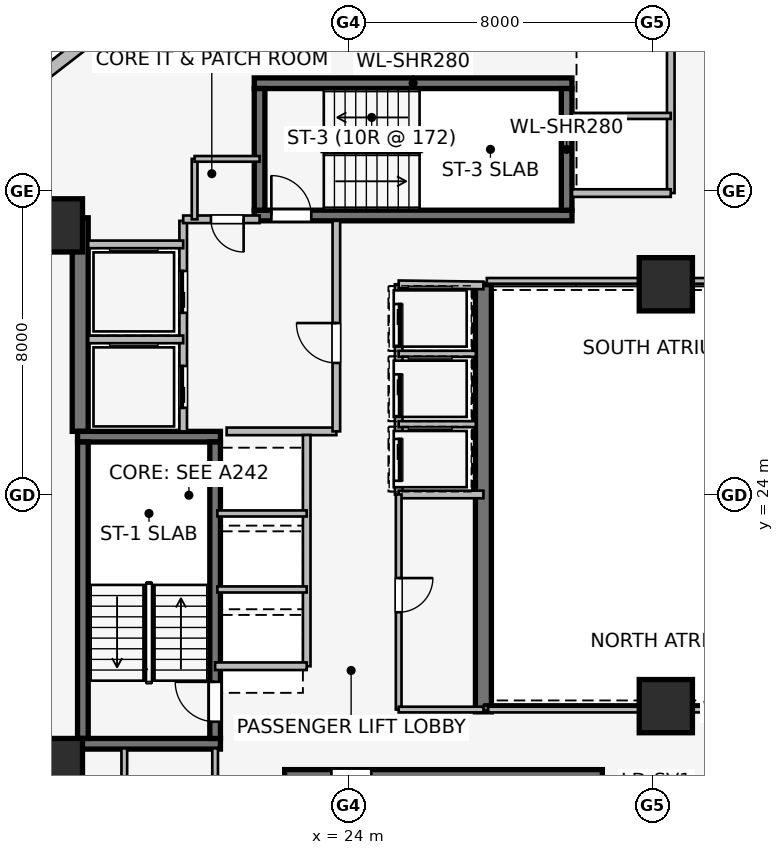
"""IFC4 building model, lengths in metres.
Left out: names, types, materials, properties, quantities, classifications, styles, units other than length and angle.
Written with IfcOpenShell. Run it as: python <this file> out.ifc"""

import sys

from ifc_helpers import new_model, si_unit, direction, frame, frame_2d, origin, origin_2d, place, context, subcontext, project, spatial, rectangle, extrude, element, fill, save


model = new_model("IFC4")
c1 = context("Model", 3, precision=1e-05, world=origin(), true_north=direction((0.0, 1.0)))
c2 = subcontext(c1, "Body", "Model", "MODEL_VIEW")
j1 = project(units=[si_unit("LENGTHUNIT", "METRE"), si_unit("PLANEANGLEUNIT", "RADIAN")], contexts=[c1])
p1 = place(None, origin())
s1 = spatial("IfcSite", under=j1, at=p1, CompositionType="ELEMENT")
p2 = place(p1, origin())
s2 = spatial("IfcBuilding", under=s1, at=p2, CompositionType="ELEMENT")
p3 = place(p2, frame((0.0, 0.0, 149.85)))
s3 = spatial("IfcBuildingStorey", under=s2, at=p3, CompositionType="ELEMENT", Elevation=149.85)
p4 = place(p3, frame((16.94, 25.68, 0.0), z_axis=(0.0, 0.0, 1.0), x_axis=(0.0, 1.0, 0.0)))
e1 = element("IfcWall", 1, at=p4, inside=s3, PredefinedType="SHEAR", context=c2, shape_type="SweptSolid", body=[
    extrude(rectangle(XDim=5.62, YDim=0.42, at=frame_2d((2.81, 0.0))), origin(), (0.0, 0.0, 1.0), 3.45),
])
p5 = place(p3, frame((27.55, 29.55, 0.0), z_axis=(0.0, 0.0, 1.0), x_axis=(0.0, -1.0, 0.0)))
e2 = element("IfcWall", 2, at=p5, inside=s3, PredefinedType="SHEAR", context=c2, shape_type="SweptSolid", body=[
    extrude(rectangle(XDim=11.25, YDim=0.42, at=frame_2d((5.625, 0.0))), origin(), (0.0, 0.0, 1.0), 3.45),
])
for number, where, z_axis, x_axis in (
    (3, (16.87, 17.46, 0.0), (0.0, 0.0, 1.0), (1.0, 0.0, 0.0)),
    (4, (20.63, 25.54, 0.0), (0.0, 0.0, 1.0), (-1.0, 0.0, 0.0)),
):
    element("IfcWall", number, at=place(p3, frame(where, z_axis=z_axis, x_axis=x_axis)), inside=s3, PredefinedType="SHEAR", context=c2, shape_type="SweptSolid", body=[
        extrude(rectangle(XDim=3.76, YDim=0.28, at=frame_2d((1.88, 0.0))), origin(), (0.0, 0.0, 1.0), 3.45),
    ])
p6 = place(p3, frame((17.01, 25.4, 0.0), z_axis=(0.0, 0.0, 1.0), x_axis=(0.0, -1.0, 0.0)))
e5 = element("IfcWall", 5, at=p6, inside=s3, PredefinedType="SHEAR", context=c2, shape_type="SweptSolid", body=[
    extrude(rectangle(XDim=7.8, YDim=0.28, at=frame_2d((3.9, 0.0))), origin(), (0.0, 0.0, 1.0), 3.45),
])
p7 = place(p3, frame((20.49, 17.6, 0.0), z_axis=(0.0, 0.0, 1.0), x_axis=(0.0, 1.0, 0.0)))
e6 = element("IfcWall", 6, at=p7, inside=s3, PredefinedType="SHEAR", context=c2, shape_type="SweptSolid", body=[
    extrude(rectangle(XDim=7.8, YDim=0.28, at=frame_2d((3.9, 0.0))), origin(), (0.0, 0.0, 1.0), 3.45),
])
p8 = place(p7, frame((0.44, 0.0, 0.0)))
e7 = element("IfcOpeningElement", 7, at=p8, cuts=e6, PredefinedType="OPENING", context=c2, shape_type="SweptSolid", body=[
    extrude(rectangle(XDim=1.05, YDim=2.0, at=frame_2d((0.525, 1.0))), frame((0.0, 0.15, 0.0), z_axis=(0.0, -1.0, 0.0), x_axis=(1.0, 0.0, 0.0)), (0.0, 0.0, 1.0), 0.3),
])
p9 = place(p3, frame((30.68, 16.64, 0.0), z_axis=(0.0, 0.0, 1.0), x_axis=(-1.0, 0.0, 0.0)))
e8 = element("IfcWall", 8, at=p9, inside=s3, PredefinedType="SHEAR", context=c2, shape_type="SweptSolid", body=[
    extrude(rectangle(XDim=8.36, YDim=0.28, at=frame_2d((4.18, 0.0))), origin(), (0.0, 0.0, 1.0), 3.45),
])
p10 = place(p9, frame((6.08, 0.0, 0.0)))
e9 = element("IfcOpeningElement", 9, at=p10, cuts=e8, PredefinedType="OPENING", context=c2, shape_type="SweptSolid", body=[
    extrude(rectangle(XDim=1.05, YDim=2.0, at=frame_2d((0.525, 1.0))), frame((0.0, 0.15, 0.0), z_axis=(0.0, -1.0, 0.0), x_axis=(1.0, 0.0, 0.0)), (0.0, 0.0, 1.0), 0.3),
])
p11 = place(p3, frame((21.52, 31.36, 0.0), z_axis=(0.0, 0.0, 1.0), x_axis=(1.0, 0.0, 0.0)))
e10 = element("IfcWall", 10, at=p11, inside=s3, PredefinedType="SHEAR", context=c2, shape_type="SweptSolid", body=[
    extrude(rectangle(XDim=8.36, YDim=0.28, at=frame_2d((4.18, 0.0))), origin(), (0.0, 0.0, 1.0), 3.45),
])
p12 = place(p11, frame((0.45, 0.0, 0.0)))
e11 = element("IfcOpeningElement", 11, at=p12, cuts=e10, PredefinedType="OPENING", context=c2, shape_type="SweptSolid", body=[
    extrude(rectangle(XDim=1.05, YDim=2.0, at=frame_2d((0.525, 1.0))), frame((0.0, 0.15, 0.0), z_axis=(0.0, -1.0, 0.0), x_axis=(1.0, 0.0, 0.0)), (0.0, 0.0, 1.0), 0.3),
])
p13 = place(p3, frame((29.88, 34.84, 0.0), z_axis=(0.0, 0.0, 1.0), x_axis=(-1.0, 0.0, 0.0)))
e12 = element("IfcWall", 12, at=p13, inside=s3, PredefinedType="SHEAR", context=c2, shape_type="SweptSolid", body=[
    extrude(rectangle(XDim=8.36, YDim=0.28, at=frame_2d((4.18, 0.0))), origin(), (0.0, 0.0, 1.0), 3.45),
])
for number, where, z_axis, x_axis in (
    (13, (21.66, 34.7, 0.0), (0.0, 0.0, 1.0), (0.0, -1.0, 0.0)),
    (14, (29.74, 31.5, 0.0), (0.0, 0.0, 1.0), (0.0, 1.0, 0.0)),
):
    element("IfcWall", number, at=place(p3, frame(where, z_axis=z_axis, x_axis=x_axis)), inside=s3, PredefinedType="SHEAR", context=c2, shape_type="SweptSolid", body=[
        extrude(rectangle(XDim=3.2, YDim=0.28, at=frame_2d((1.6, 0.0))), origin(), (0.0, 0.0, 1.0), 3.45),
    ])
for number, where, z_axis, x_axis in (
    (15, (16.3, 16.9, 0.0), (0.0, 0.0, 1.0), (1.0, 0.0, 0.0)),
    (16, (16.3, 31.1, 0.0), (0.0, 0.0, 1.0), (1.0, 0.0, 0.0)),
    (17, (32.35, 18.45, 0.0), (0.0, 0.0, 1.0), (1.0, 0.0, 0.0)),
    (18, (32.35, 29.55, 0.0), (0.0, 0.0, 1.0), (1.0, 0.0, 0.0)),
):
    element("IfcColumn", number, at=place(p3, frame(where, z_axis=z_axis, x_axis=x_axis)), inside=s3, PredefinedType="COLUMN", context=c2, shape_type="SweptSolid", body=[
        extrude(rectangle(XDim=1.4, YDim=1.4, at=origin_2d()), origin(), (0.0, 0.0, 1.0), 3.45),
    ])
p14 = place(p3, frame((15.918, 35.024, 0.0), z_axis=(0.0, 0.0, 1.0), x_axis=(0.790621329885, 0.612305408053, 0.0)))
e19 = element("IfcWall", 19, at=p14, inside=s3, PredefinedType="STANDARD", context=c2, shape_type="SweptSolid", body=[
    extrude(rectangle(XDim=1.676, YDim=0.33, at=frame_2d((0.838, 0.0))), origin(), (0.0, 0.0, 1.0), 3.19),
])
p15 = place(p3, frame((19.65, 25.68, 0.0), z_axis=(0.0, 0.0, 1.0), x_axis=(0.0, 1.0, 0.0)))
e20 = element("IfcWall", 20, at=p15, inside=s3, PredefinedType="PARTITIONING", context=c2, shape_type="SweptSolid", body=[
    extrude(rectangle(XDim=5.54, YDim=0.2, at=frame_2d((2.77, 0.0))), origin(), (0.0, 0.0, 1.0), 3.19),
])
p16 = place(p15, frame((0.62, 0.0, 0.0)))
e21 = element("IfcOpeningElement", 21, at=p16, cuts=e20, PredefinedType="OPENING", context=c2, shape_type="SweptSolid", body=[
    extrude(rectangle(XDim=1.1, YDim=2.2, at=frame_2d((0.55, 1.1))), frame((0.0, 0.11, 0.0), z_axis=(0.0, -1.0, 0.0), x_axis=(1.0, 0.0, 0.0)), (0.0, 0.0, 1.0), 0.22),
])
p17 = place(p15, frame((3.12, 0.0, 0.0)))
e22 = element("IfcOpeningElement", 22, at=p17, cuts=e20, PredefinedType="OPENING", context=c2, shape_type="SweptSolid", body=[
    extrude(rectangle(XDim=1.1, YDim=2.2, at=frame_2d((0.55, 1.1))), frame((0.0, 0.11, 0.0), z_axis=(0.0, -1.0, 0.0), x_axis=(1.0, 0.0, 0.0)), (0.0, 0.0, 1.0), 0.22),
])
p18 = place(p3, frame((20.793, 25.68, 0.0), z_axis=(0.0, 0.0, 1.0), x_axis=(1.0, 0.0, 0.0)))
e23 = element("IfcWall", 23, at=p18, inside=s3, PredefinedType="PARTITIONING", context=c2, shape_type="SweptSolid", body=[
    extrude(rectangle(XDim=2.887, YDim=0.2, at=frame_2d((1.443, 0.0))), origin(), (0.0, 0.0, 1.0), 3.19),
])
p19 = place(p3, frame((23.68, 25.68, 0.0), z_axis=(0.0, 0.0, 1.0), x_axis=(0.0, 1.0, 0.0)))
e24 = element("IfcWall", 24, at=p19, inside=s3, PredefinedType="PARTITIONING", context=c2, shape_type="SweptSolid", body=[
    extrude(rectangle(XDim=5.54, YDim=0.2, at=frame_2d((2.77, 0.0))), origin(), (0.0, 0.0, 1.0), 3.19),
])
p20 = place(p19, frame((1.8, 0.0, 0.0)))
e25 = element("IfcOpeningElement", 25, at=p20, cuts=e24, PredefinedType="OPENING", context=c2, shape_type="SweptSolid", body=[
    extrude(rectangle(XDim=1.05, YDim=2.0, at=frame_2d((0.525, 1.0))), frame((0.0, 0.11, 0.0), z_axis=(0.0, -1.0, 0.0), x_axis=(1.0, 0.0, 0.0)), (0.0, 0.0, 1.0), 0.22),
])
p21 = place(p3, frame((21.66, 31.26, 0.0), z_axis=(0.0, 0.0, 1.0), x_axis=(-1.0, 0.0, 0.0)))
e26 = element("IfcWall", 26, at=p21, inside=s3, PredefinedType="PARTITIONING", context=c2, shape_type="SweptSolid", body=[
    extrude(rectangle(XDim=2.01, YDim=0.2, at=frame_2d((1.005, 0.0))), origin(), (0.0, 0.0, 1.0), 3.19),
])
p22 = place(p21, frame((0.42, 0.0, 0.0)))
e27 = element("IfcOpeningElement", 27, at=p22, cuts=e26, PredefinedType="OPENING", context=c2, shape_type="SweptSolid", body=[
    extrude(rectangle(XDim=0.86, YDim=2.0, at=frame_2d((0.43, 1.0))), frame((0.0, 0.11, 0.0), z_axis=(0.0, -1.0, 0.0), x_axis=(1.0, 0.0, 0.0)), (0.0, 0.0, 1.0), 0.22),
])
p23 = place(p3, frame((17.15, 28.1, 0.0), z_axis=(0.0, 0.0, 1.0), x_axis=(1.0, 0.0, 0.0)))
e28 = element("IfcWall", 28, at=p23, inside=s3, PredefinedType="PARTITIONING", context=c2, shape_type="SweptSolid", body=[
    extrude(rectangle(XDim=2.5, YDim=0.2, at=frame_2d((1.25, 0.0))), origin(), (0.0, 0.0, 1.0), 3.19),
])
p24 = place(p3, frame((19.65, 30.6, 0.0), z_axis=(0.0, 0.0, 1.0), x_axis=(-1.0, 0.0, 0.0)))
e29 = element("IfcWall", 29, at=p24, inside=s3, PredefinedType="PARTITIONING", context=c2, shape_type="SweptSolid", body=[
    extrude(rectangle(XDim=2.5, YDim=0.2, at=frame_2d((1.25, 0.0))), origin(), (0.0, 0.0, 1.0), 2.09),
])
p25 = place(p3, frame((32.48, 31.95, 0.0), z_axis=(0.0, 0.0, 1.0), x_axis=(0.0, 1.0, 0.0)))
e30 = element("IfcWall", 30, at=p25, inside=s3, PredefinedType="PARTITIONING", context=c2, shape_type="SweptSolid", body=[
    extrude(rectangle(XDim=4.05, YDim=0.2, at=frame_2d((2.025, 0.0))), origin(), (0.0, 0.0, 1.0), 3.19),
])
p26 = place(p3, frame((32.48, 31.95, 0.0), z_axis=(0.0, 0.0, 1.0), x_axis=(-1.0, 0.0, 0.0)))
e31 = element("IfcWall", 31, at=p26, inside=s3, PredefinedType="PARTITIONING", context=c2, shape_type="SweptSolid", body=[
    extrude(rectangle(XDim=2.6, YDim=0.2, at=frame_2d((1.3, 0.0))), origin(), (0.0, 0.0, 1.0), 3.19),
])
p27 = place(p3, frame((29.875, 33.98, 0.0), z_axis=(0.0, 0.0, 1.0), x_axis=(1.0, 0.0, 0.0)))
e32 = element("IfcWall", 32, at=p27, inside=s3, PredefinedType="PARTITIONING", context=c2, shape_type="SweptSolid", body=[
    extrude(rectangle(XDim=2.605, YDim=0.16, at=frame_2d((1.302, 0.0))), origin(), (0.0, 0.0, 1.0), 3.19),
])
p28 = place(p3, frame((22.9, 19.5, 0.0), z_axis=(0.0, 0.0, 1.0), x_axis=(0.0, 1.0, 0.0)))
e33 = element("IfcWall", 33, at=p28, inside=s3, PredefinedType="PARTITIONING", context=c2, shape_type="SweptSolid", body=[
    extrude(rectangle(XDim=6.085, YDim=0.2, at=frame_2d((3.042, 0.0))), origin(), (0.0, 0.0, 1.0), 3.19),
])
p29 = place(p3, frame((20.49, 19.5, 0.0), z_axis=(0.0, 0.0, 1.0), x_axis=(1.0, 0.0, 0.0)))
e34 = element("IfcWall", 34, at=p29, inside=s3, PredefinedType="PARTITIONING", context=c2, shape_type="SweptSolid", body=[
    extrude(rectangle(XDim=2.41, YDim=0.2, at=frame_2d((1.205, 0.0))), origin(), (0.0, 0.0, 1.0), 2.09),
])
for number, where, z_axis, x_axis in (
    (35, (20.55, 21.52, 0.0), (0.0, 0.0, 1.0), (1.0, 0.0, 0.0)),
    (36, (20.55, 23.52, 0.0), (0.0, 0.0, 1.0), (1.0, 0.0, 0.0)),
):
    element("IfcWall", number, at=place(p3, frame(where, z_axis=z_axis, x_axis=x_axis)), inside=s3, PredefinedType="PARTITIONING", context=c2, shape_type="SweptSolid", body=[
        extrude(rectangle(XDim=2.35, YDim=0.16, at=frame_2d((1.175, 0.0))), origin(), (0.0, 0.0, 1.0), 3.19),
    ])
p30 = place(p3, frame((25.32, 29.55, 0.0), z_axis=(0.0, 0.0, 1.0), x_axis=(0.0, -1.0, 0.0)))
e37 = element("IfcWall", 37, at=p30, inside=s3, PredefinedType="PARTITIONING", context=c2, shape_type="SweptSolid", body=[
    extrude(rectangle(XDim=5.53, YDim=0.2, at=frame_2d((2.765, 0.0))), origin(), (0.0, 0.0, 1.0), 3.19),
])
p31 = place(p30, frame((0.52, 0.0, 0.0)))
e38 = element("IfcOpeningElement", 38, at=p31, cuts=e37, PredefinedType="OPENING", context=c2, shape_type="SweptSolid", body=[
    extrude(rectangle(XDim=1.1, YDim=2.2, at=frame_2d((0.55, 1.1))), frame((0.0, 0.11, 0.0), z_axis=(0.0, -1.0, 0.0), x_axis=(1.0, 0.0, 0.0)), (0.0, 0.0, 1.0), 0.22),
])
p32 = place(p30, frame((2.37, 0.0, 0.0)))
e39 = element("IfcOpeningElement", 39, at=p32, cuts=e37, PredefinedType="OPENING", context=c2, shape_type="SweptSolid", body=[
    extrude(rectangle(XDim=1.1, YDim=2.2, at=frame_2d((0.55, 1.1))), frame((0.0, 0.11, 0.0), z_axis=(0.0, -1.0, 0.0), x_axis=(1.0, 0.0, 0.0)), (0.0, 0.0, 1.0), 0.22),
])
p33 = place(p30, frame((4.07, 0.0, 0.0)))
e40 = element("IfcOpeningElement", 40, at=p33, cuts=e37, PredefinedType="OPENING", context=c2, shape_type="SweptSolid", body=[
    extrude(rectangle(XDim=1.1, YDim=2.2, at=frame_2d((0.55, 1.1))), frame((0.0, 0.11, 0.0), z_axis=(0.0, -1.0, 0.0), x_axis=(1.0, 0.0, 0.0)), (0.0, 0.0, 1.0), 0.22),
])
p34 = place(p3, frame((27.55, 29.52, 0.0), z_axis=(0.0, 0.0, 1.0), x_axis=(-0.999909343457, 0.013464949556, 0.0)))
e41 = element("IfcWall", 41, at=p34, inside=s3, PredefinedType="PARTITIONING", context=c2, shape_type="SweptSolid", body=[
    extrude(rectangle(XDim=2.23, YDim=0.2, at=frame_2d((1.115, 0.0))), origin(), (0.0, 0.0, 1.0), 2.09),
])
p35 = place(p3, frame((25.32, 24.02, 0.0), z_axis=(0.0, 0.0, 1.0), x_axis=(1.0, 0.0, 0.0)))
e42 = element("IfcWall", 42, at=p35, inside=s3, PredefinedType="PARTITIONING", context=c2, shape_type="SweptSolid", body=[
    extrude(rectangle(XDim=2.23, YDim=0.2, at=frame_2d((1.115, 0.0))), origin(), (0.0, 0.0, 1.0), 3.19),
])
for number, where, z_axis, x_axis in (
    (43, (25.32, 25.87, 0.0), (0.0, 0.0, 1.0), (1.0, 0.0, 0.0)),
    (44, (25.32, 27.72, 0.0), (0.0, 0.0, 1.0), (1.0, 0.0, 0.0)),
):
    element("IfcWall", number, at=place(p3, frame(where, z_axis=z_axis, x_axis=x_axis)), inside=s3, PredefinedType="PARTITIONING", context=c2, shape_type="SweptSolid", body=[
        extrude(rectangle(XDim=2.03, YDim=0.16, at=frame_2d((1.015, 0.0))), origin(), (0.0, 0.0, 1.0), 3.19),
    ])
p36 = place(p3, frame((25.32, 24.02, 0.0), z_axis=(0.0, 0.0, 1.0), x_axis=(0.0, -1.0, 0.0)))
e45 = element("IfcWall", 45, at=p36, inside=s3, PredefinedType="PARTITIONING", context=c2, shape_type="SweptSolid", body=[
    extrude(rectangle(XDim=5.66, YDim=0.15, at=frame_2d((2.83, 0.0))), origin(), (0.0, 0.0, 1.0), 3.19),
])
p37 = place(p36, frame((2.2, 0.0, 0.0)))
e46 = element("IfcOpeningElement", 46, at=p37, cuts=e45, PredefinedType="OPENING", context=c2, shape_type="SweptSolid", body=[
    extrude(rectangle(XDim=0.9, YDim=2.0, at=frame_2d((0.45, 1.0))), frame((0.0, 0.085, 0.0), z_axis=(0.0, -1.0, 0.0), x_axis=(1.0, 0.0, 0.0)), (0.0, 0.0, 1.0), 0.17),
])
p38 = place(p3, frame((25.32, 18.36, 0.0), z_axis=(0.0, 0.0, 1.0), x_axis=(1.0, 0.0, 0.0)))
e47 = element("IfcWall", 47, at=p38, inside=s3, PredefinedType="PARTITIONING", context=c2, shape_type="SweptSolid", body=[
    extrude(rectangle(XDim=2.23, YDim=0.15, at=frame_2d((1.115, 0.0))), origin(), (0.0, 0.0, 1.0), 3.19),
])
p39 = place(p3, frame((18.1, 17.34, 0.0), z_axis=(0.0, 0.0, 1.0), x_axis=(0.0, -1.0, 0.0)))
e48 = element("IfcWall", 48, at=p39, inside=s3, PredefinedType="PARTITIONING", context=c2, shape_type="SweptSolid", body=[
    extrude(rectangle(XDim=4.14, YDim=0.15, at=frame_2d((2.07, 0.0))), origin(), (0.0, 0.0, 1.0), 3.19),
])
p40 = place(p3, frame((20.49, 13.2, 0.0), z_axis=(0.0, 0.0, 1.0), x_axis=(0.0, 1.0, 0.0)))
e49 = element("IfcWall", 49, at=p40, inside=s3, PredefinedType="PARTITIONING", context=c2, shape_type="SweptSolid", body=[
    extrude(rectangle(XDim=4.14, YDim=0.15, at=frame_2d((2.07, 0.0))), origin(), (0.0, 0.0, 1.0), 3.19),
])
p41 = place(p40, frame((1.25, 0.0, 0.0)))
e50 = element("IfcOpeningElement", 50, at=p41, cuts=e49, PredefinedType="OPENING", context=c2, shape_type="SweptSolid", body=[
    extrude(rectangle(XDim=0.9, YDim=2.0, at=frame_2d((0.45, 1.0))), frame((0.0, 0.085, 0.0), z_axis=(0.0, -1.0, 0.0), x_axis=(1.0, 0.0, 0.0)), (0.0, 0.0, 1.0), 0.17),
])
p42 = place(p3, frame((19.95, 32.85, 0.0), z_axis=(0.0, 0.0, 1.0), x_axis=(0.0, -1.0, 0.0)))
e51 = element("IfcWall", 51, at=p42, inside=s3, PredefinedType="PARTITIONING", context=c2, shape_type="SweptSolid", body=[
    extrude(rectangle(XDim=1.59, YDim=0.15, at=frame_2d((0.795, 0.0))), origin(), (0.0, 0.0, 1.0), 3.19),
])
p43 = place(p3, frame((21.66, 32.85, 0.0), z_axis=(0.0, 0.0, 1.0), x_axis=(-1.0, 0.0, 0.0)))
e52 = element("IfcWall", 52, at=p43, inside=s3, PredefinedType="PARTITIONING", context=c2, shape_type="SweptSolid", body=[
    extrude(rectangle(XDim=1.71, YDim=0.15, at=frame_2d((0.855, 0.0))), origin(), (0.0, 0.0, 1.0), 3.19),
])
p44 = place(p3, frame((27.675, 18.36, 0.0), z_axis=(0.0, 0.0, 1.0), x_axis=(1.0, 0.0, 0.0)))
e53 = element("IfcWall", 53, at=p44, inside=s3, PredefinedType="PARTITIONING", context=c2, shape_type="SweptSolid", body=[
    extrude(rectangle(XDim=12.165, YDim=0.15, at=frame_2d((6.083, 0.0))), origin(), (0.0, 0.0, 1.0), 2.331),
])
p45 = place(p3, frame((39.84, 29.64, 0.0), z_axis=(0.0, 0.0, 1.0), x_axis=(-1.0, 0.0, 0.0)))
e54 = element("IfcWall", 54, at=p45, inside=s3, PredefinedType="PARTITIONING", context=c2, shape_type="SweptSolid", body=[
    extrude(rectangle(XDim=12.2, YDim=0.15, at=frame_2d((6.1, 0.0))), origin(), (0.0, 0.0, 1.0), 2.331),
])
p46 = place(p8, origin())
e55 = element("IfcDoor", 55, at=p46, inside=s3, OperationType="SINGLE_SWING_RIGHT", PredefinedType="DOOR", context=c2, shape_type="SweptSolid", body=[
    extrude(rectangle(XDim=1.05, YDim=2.0, at=frame_2d((0.525, 1.0))), frame((0.0, 0.025, 0.0), z_axis=(0.0, -1.0, 0.0), x_axis=(1.0, 0.0, 0.0)), (0.0, 0.0, 1.0), 0.05),
])
fill(e7, e55)
p47 = place(p10, origin())
e56 = element("IfcDoor", 56, at=p47, inside=s3, OperationType="SINGLE_SWING_RIGHT", PredefinedType="DOOR", context=c2, shape_type="SweptSolid", body=[
    extrude(rectangle(XDim=1.05, YDim=2.0, at=frame_2d((0.525, 1.0))), frame((0.0, 0.025, 0.0), z_axis=(0.0, -1.0, 0.0), x_axis=(1.0, 0.0, 0.0)), (0.0, 0.0, 1.0), 0.05),
])
fill(e9, e56)
p48 = place(p12, origin())
e57 = element("IfcDoor", 57, at=p48, inside=s3, OperationType="SINGLE_SWING_LEFT", PredefinedType="DOOR", context=c2, shape_type="SweptSolid", body=[
    extrude(rectangle(XDim=1.05, YDim=2.0, at=frame_2d((0.525, 1.0))), frame((0.0, 0.025, 0.0), z_axis=(0.0, -1.0, 0.0), x_axis=(1.0, 0.0, 0.0)), (0.0, 0.0, 1.0), 0.05),
])
fill(e11, e57)
p49 = place(p16, origin())
e58 = element("IfcDoor", 58, at=p49, inside=s3, OperationType="SLIDING_TO_LEFT", PredefinedType="DOOR", context=c2, shape_type="SweptSolid", body=[
    extrude(rectangle(XDim=1.1, YDim=2.2, at=frame_2d((0.55, 1.1))), frame((0.0, 0.025, 0.0), z_axis=(0.0, -1.0, 0.0), x_axis=(1.0, 0.0, 0.0)), (0.0, 0.0, 1.0), 0.05),
])
fill(e21, e58)
p50 = place(p17, origin())
e59 = element("IfcDoor", 59, at=p50, inside=s3, OperationType="SLIDING_TO_LEFT", PredefinedType="DOOR", context=c2, shape_type="SweptSolid", body=[
    extrude(rectangle(XDim=1.1, YDim=2.2, at=frame_2d((0.55, 1.1))), frame((0.0, 0.025, 0.0), z_axis=(0.0, -1.0, 0.0), x_axis=(1.0, 0.0, 0.0)), (0.0, 0.0, 1.0), 0.05),
])
fill(e22, e59)
p51 = place(p20, origin())
e60 = element("IfcDoor", 60, at=p51, inside=s3, OperationType="SINGLE_SWING_RIGHT", PredefinedType="DOOR", context=c2, shape_type="SweptSolid", body=[
    extrude(rectangle(XDim=1.05, YDim=2.0, at=frame_2d((0.525, 1.0))), frame((0.0, 0.025, 0.0), z_axis=(0.0, -1.0, 0.0), x_axis=(1.0, 0.0, 0.0)), (0.0, 0.0, 1.0), 0.05),
])
fill(e25, e60)
p52 = place(p22, origin())
e61 = element("IfcDoor", 61, at=p52, inside=s3, OperationType="SINGLE_SWING_LEFT", PredefinedType="DOOR", context=c2, shape_type="SweptSolid", body=[
    extrude(rectangle(XDim=0.86, YDim=2.0, at=frame_2d((0.43, 1.0))), frame((0.0, 0.025, 0.0), z_axis=(0.0, -1.0, 0.0), x_axis=(1.0, 0.0, 0.0)), (0.0, 0.0, 1.0), 0.05),
])
fill(e27, e61)
p53 = place(p31, origin())
e62 = element("IfcDoor", 62, at=p53, inside=s3, OperationType="SLIDING_TO_LEFT", PredefinedType="DOOR", context=c2, shape_type="SweptSolid", body=[
    extrude(rectangle(XDim=1.1, YDim=2.2, at=frame_2d((0.55, 1.1))), frame((0.0, 0.025, 0.0), z_axis=(0.0, -1.0, 0.0), x_axis=(1.0, 0.0, 0.0)), (0.0, 0.0, 1.0), 0.05),
])
fill(e38, e62)
p54 = place(p32, origin())
e63 = element("IfcDoor", 63, at=p54, inside=s3, OperationType="SLIDING_TO_LEFT", PredefinedType="DOOR", context=c2, shape_type="SweptSolid", body=[
    extrude(rectangle(XDim=1.1, YDim=2.2, at=frame_2d((0.55, 1.1))), frame((0.0, 0.025, 0.0), z_axis=(0.0, -1.0, 0.0), x_axis=(1.0, 0.0, 0.0)), (0.0, 0.0, 1.0), 0.05),
])
fill(e39, e63)
p55 = place(p33, origin())
e64 = element("IfcDoor", 64, at=p55, inside=s3, OperationType="SLIDING_TO_LEFT", PredefinedType="DOOR", context=c2, shape_type="SweptSolid", body=[
    extrude(rectangle(XDim=1.1, YDim=2.2, at=frame_2d((0.55, 1.1))), frame((0.0, 0.025, 0.0), z_axis=(0.0, -1.0, 0.0), x_axis=(1.0, 0.0, 0.0)), (0.0, 0.0, 1.0), 0.05),
])
fill(e40, e64)
p56 = place(p37, origin())
e65 = element("IfcDoor", 65, at=p56, inside=s3, OperationType="SINGLE_SWING_LEFT", PredefinedType="DOOR", context=c2, shape_type="SweptSolid", body=[
    extrude(rectangle(XDim=0.9, YDim=2.0, at=frame_2d((0.45, 1.0))), frame((0.0, 0.025, 0.0), z_axis=(0.0, -1.0, 0.0), x_axis=(1.0, 0.0, 0.0)), (0.0, 0.0, 1.0), 0.05),
])
fill(e46, e65)
save(model, sys.argv[1])
